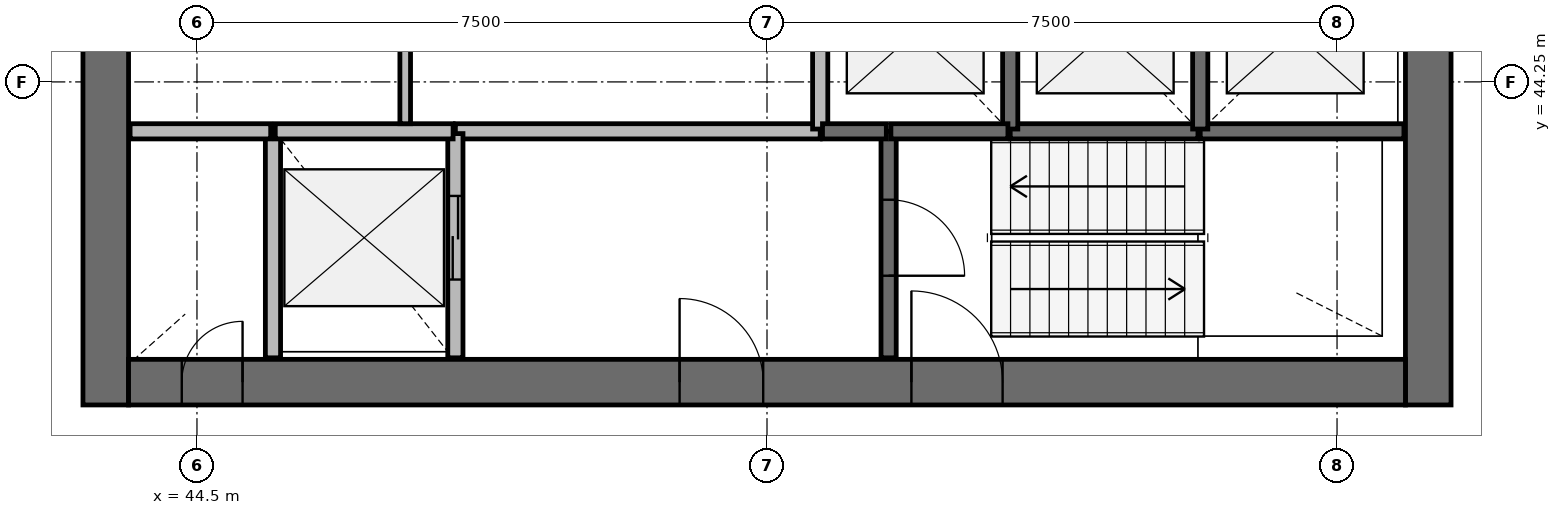
"""IFC4 building model, lengths in metres.
Left out: names, types, materials, properties, quantities, classifications, styles, units other than length and angle.
Written with IfcOpenShell. Run it as: python <this file> out.ifc"""

import sys

from ifc_helpers import new_model, si_unit, direction, frame, frame_2d, origin, place, context, subcontext, project, spatial, rectangle, extrude, source, transform, mapped, element, fill, save


model = new_model("IFC4")
c1 = context("Model", 3, precision=1e-05, world=origin(), true_north=direction((0.0, 1.0)))
c2 = subcontext(c1, "Body", "Model", "MODEL_VIEW")
j1 = project(units=[si_unit("LENGTHUNIT", "METRE"), si_unit("PLANEANGLEUNIT", "RADIAN")], contexts=[c1])
p1 = place(None, origin())
s1 = spatial("IfcSite", under=j1, at=p1, CompositionType="ELEMENT")
p2 = place(p1, origin())
s2 = spatial("IfcBuilding", under=s1, at=p2, CompositionType="ELEMENT")
p3 = place(p2, frame((0.0, 0.0, 211.1)))
s3 = spatial("IfcBuildingStorey", under=s2, at=p3, CompositionType="ELEMENT", Elevation=211.1)
p4 = place(p3, frame((60.7, 40.0, 0.0), z_axis=(0.0, 0.0, 1.0), x_axis=(0.0, 1.0, 0.0)))
e1 = element("IfcWall", 1, at=p4, inside=s3, PredefinedType="SHEAR", context=c2, shape_type="SweptSolid", body=[
    extrude(rectangle(XDim=16.0, YDim=0.6, at=frame_2d((8.0, 0.0))), origin(), (0.0, 0.0, 1.0), 3.9),
])
p5 = place(p4, frame((7.1, 0.0, 0.0)))
e2 = element("IfcOpeningElement", 2, at=p5, cuts=e1, PredefinedType="OPENING", context=c2, shape_type="SweptSolid", body=[
    extrude(rectangle(XDim=1.8, YDim=2.1, at=frame_2d((0.9, 1.05))), frame((0.0, 0.31, 0.0), z_axis=(0.0, -1.0, 0.0), x_axis=(1.0, 0.0, 0.0)), (0.0, 0.0, 1.0), 0.62),
])
p6 = place(p3, frame((43.3, 56.0, 0.0), z_axis=(0.0, 0.0, 1.0), x_axis=(0.0, -1.0, 0.0)))
e3 = element("IfcWall", 3, at=p6, inside=s3, PredefinedType="SHEAR", context=c2, shape_type="SweptSolid", body=[
    extrude(rectangle(XDim=16.0, YDim=0.6, at=frame_2d((8.0, 0.0))), origin(), (0.0, 0.0, 1.0), 3.9),
])
p7 = place(p6, frame((7.1, 0.0, 0.0)))
e4 = element("IfcOpeningElement", 4, at=p7, cuts=e3, PredefinedType="OPENING", context=c2, shape_type="SweptSolid", body=[
    extrude(rectangle(XDim=1.8, YDim=2.1, at=frame_2d((0.9, 1.05))), frame((0.0, 0.31, 0.0), z_axis=(0.0, -1.0, 0.0), x_axis=(1.0, 0.0, 0.0)), (0.0, 0.0, 1.0), 0.62),
])
p8 = place(p3, frame((43.6, 40.3, 0.0), z_axis=(0.0, 0.0, 1.0), x_axis=(1.0, 0.0, 0.0)))
e5 = element("IfcWall", 5, at=p8, inside=s3, PredefinedType="SHEAR", context=c2, shape_type="SweptSolid", body=[
    extrude(rectangle(XDim=16.8, YDim=0.6, at=frame_2d((8.4, 0.0))), origin(), (0.0, 0.0, 1.0), 3.9),
])
p9 = place(p8, frame((10.3, 0.0, 0.0)))
e6 = element("IfcOpeningElement", 6, at=p9, cuts=e5, PredefinedType="OPENING", context=c2, shape_type="SweptSolid", body=[
    extrude(rectangle(XDim=1.2, YDim=2.1, at=frame_2d((0.6, 1.05))), frame((0.0, 0.31, 0.0), z_axis=(0.0, -1.0, 0.0), x_axis=(1.0, 0.0, 0.0)), (0.0, 0.0, 1.0), 0.62),
])
p10 = place(p8, frame((7.25, 0.0, 0.0)))
e7 = element("IfcOpeningElement", 7, at=p10, cuts=e5, PredefinedType="OPENING", context=c2, shape_type="SweptSolid", body=[
    extrude(rectangle(XDim=1.1, YDim=2.1, at=frame_2d((0.55, 1.05))), frame((0.0, 0.31, 0.0), z_axis=(0.0, -1.0, 0.0), x_axis=(1.0, 0.0, 0.0)), (0.0, 0.0, 1.0), 0.62),
])
p11 = place(p8, frame((0.7, 0.0, 0.0)))
e8 = element("IfcOpeningElement", 8, at=p11, cuts=e5, PredefinedType="OPENING", context=c2, shape_type="SweptSolid", body=[
    extrude(rectangle(XDim=0.8, YDim=2.1, at=frame_2d((0.4, 1.05))), frame((0.0, 0.31, 0.0), z_axis=(0.0, -1.0, 0.0), x_axis=(1.0, 0.0, 0.0)), (0.0, 0.0, 1.0), 0.62),
])
p12 = place(p3, frame((52.7, 43.6, 0.0), z_axis=(0.0, 0.0, 1.0), x_axis=(-1.0, 0.0, 0.0)))
e9 = element("IfcWall", 9, at=p12, inside=s3, PredefinedType="SOLIDWALL", context=c2, shape_type="SweptSolid", body=[
    extrude(rectangle(XDim=4.8, YDim=0.2, at=frame_2d((2.4, 0.0))), origin(), (0.0, 0.0, 1.0), 3.58),
])
p13 = place(p3, frame((45.5, 43.6, 0.0), z_axis=(0.0, 0.0, 1.0), x_axis=(0.0, -1.0, 0.0)))
e10 = element("IfcWall", 10, at=p13, inside=s3, PredefinedType="SOLIDWALL", context=c2, shape_type="SweptSolid", body=[
    extrude(rectangle(XDim=2.98, YDim=0.2, at=frame_2d((1.49, 0.0))), origin(), (0.0, 0.0, 1.0), 3.58),
])
p14 = place(p3, frame((47.9, 40.62, 0.0), z_axis=(0.0, 0.0, 1.0), x_axis=(0.0, 1.0, 0.0)))
e11 = element("IfcWall", 11, at=p14, inside=s3, PredefinedType="SOLIDWALL", context=c2, shape_type="SweptSolid", body=[
    extrude(rectangle(XDim=2.95, YDim=0.2, at=frame_2d((1.475, 0.0))), origin(), (0.0, 0.0, 1.0), 3.58),
])
p15 = place(p14, frame((1.03, 0.0, 0.0)))
e12 = element("IfcOpeningElement", 12, at=p15, cuts=e11, PredefinedType="OPENING", context=c2, shape_type="SweptSolid", body=[
    extrude(rectangle(XDim=1.1, YDim=2.1, at=frame_2d((0.55, 1.05))), frame((0.0, 0.11, 0.0), z_axis=(0.0, -1.0, 0.0), x_axis=(1.0, 0.0, 0.0)), (0.0, 0.0, 1.0), 0.22),
])
p16 = place(p3, frame((53.6, 43.6, 0.0), z_axis=(0.0, 0.0, 1.0), x_axis=(0.0, -1.0, 0.0)))
e13 = element("IfcWall", 13, at=p16, inside=s3, PredefinedType="SOLIDWALL", context=c2, shape_type="SweptSolid", body=[
    extrude(rectangle(XDim=2.98, YDim=0.2, at=frame_2d((1.49, 0.0))), origin(), (0.0, 0.0, 1.0), 3.58),
])
p17 = place(p16, frame((0.9, 0.0, 0.0)))
e14 = element("IfcOpeningElement", 14, at=p17, cuts=e13, PredefinedType="OPENING", context=c2, shape_type="SweptSolid", body=[
    extrude(rectangle(XDim=1.0, YDim=2.1, at=frame_2d((0.5, 1.05))), frame((0.0, 0.11, 0.0), z_axis=(0.0, -1.0, 0.0), x_axis=(1.0, 0.0, 0.0)), (0.0, 0.0, 1.0), 0.22),
])
p18 = place(p3, frame((57.7, 43.6, 0.0), z_axis=(0.0, 0.0, 1.0), x_axis=(1.0, 0.0, 0.0)))
e15 = element("IfcWall", 15, at=p18, inside=s3, PredefinedType="SOLIDWALL", context=c2, shape_type="SweptSolid", body=[
    extrude(rectangle(XDim=2.68, YDim=0.2, at=frame_2d((1.34, 0.0))), origin(), (0.0, 0.0, 1.0), 3.58),
])
p19 = place(p3, frame((55.2, 43.6, 0.0), z_axis=(0.0, 0.0, 1.0), x_axis=(1.0, 0.0, 0.0)))
e16 = element("IfcWall", 16, at=p19, inside=s3, PredefinedType="SOLIDWALL", context=c2, shape_type="SweptSolid", body=[
    extrude(rectangle(XDim=2.47, YDim=0.2, at=frame_2d((1.235, 0.0))), origin(), (0.0, 0.0, 1.0), 3.58),
])
p20 = place(p3, frame((47.87, 43.6, 0.0), z_axis=(0.0, 0.0, 1.0), x_axis=(-1.0, 0.0, 0.0)))
e17 = element("IfcWall", 17, at=p20, inside=s3, PredefinedType="SOLIDWALL", context=c2, shape_type="SweptSolid", body=[
    extrude(rectangle(XDim=2.34, YDim=0.2, at=frame_2d((1.17, 0.0))), origin(), (0.0, 0.0, 1.0), 3.58),
])
for number, where, z_axis, x_axis in (
    (18, (52.7, 45.99, 0.0), (0.0, 0.0, 1.0), (0.0, -1.0, 0.0)),
    (19, (55.2, 43.63, 0.0), (0.0, 0.0, 1.0), (0.0, 1.0, 0.0)),
    (20, (57.7, 43.63, 0.0), (0.0, 0.0, 1.0), (0.0, 1.0, 0.0)),
):
    element("IfcWall", number, at=place(p3, frame(where, z_axis=z_axis, x_axis=x_axis)), inside=s3, PredefinedType="SOLIDWALL", context=c2, shape_type="SweptSolid", body=[
        extrude(rectangle(XDim=2.36, YDim=0.2, at=frame_2d((1.18, 0.0))), origin(), (0.0, 0.0, 1.0), 3.58),
    ])
p21 = place(p3, frame((45.47, 43.6, 0.0), z_axis=(0.0, 0.0, 1.0), x_axis=(-1.0, 0.0, 0.0)))
e21 = element("IfcWall", 21, at=p21, inside=s3, PredefinedType="SOLIDWALL", context=c2, shape_type="SweptSolid", body=[
    extrude(rectangle(XDim=1.85, YDim=0.2, at=frame_2d((0.925, 0.0))), origin(), (0.0, 0.0, 1.0), 3.58),
])
p22 = place(p3, frame((53.63, 43.6, 0.0), z_axis=(0.0, 0.0, 1.0), x_axis=(1.0, 0.0, 0.0)))
e22 = element("IfcWall", 22, at=p22, inside=s3, PredefinedType="SOLIDWALL", context=c2, shape_type="SweptSolid", body=[
    extrude(rectangle(XDim=1.54, YDim=0.2, at=frame_2d((0.77, 0.0))), origin(), (0.0, 0.0, 1.0), 3.58),
])
p23 = place(p3, frame((52.73, 43.6, 0.0), z_axis=(0.0, 0.0, 1.0), x_axis=(1.0, 0.0, 0.0)))
e23 = element("IfcWall", 23, at=p23, inside=s3, PredefinedType="SOLIDWALL", context=c2, shape_type="SweptSolid", body=[
    extrude(rectangle(XDim=0.84, YDim=0.2, at=frame_2d((0.42, 0.0))), origin(), (0.0, 0.0, 1.0), 3.58),
])
p24 = place(p3, frame((47.24, 43.7, 0.0), z_axis=(0.0, 0.0, 1.0), x_axis=(0.0, 1.0, 0.0)))
e24 = element("IfcWall", 24, at=p24, inside=s3, PredefinedType="PARTITIONING", context=c2, shape_type="SweptSolid", body=[
    extrude(rectangle(XDim=2.29, YDim=0.14, at=frame_2d((1.145, 0.0))), origin(), (0.0, 0.0, 1.0), 2.88),
])
m1 = source(origin(), c2, "Body", "SweptSolid", [
    extrude(rectangle(XDim=1.1, YDim=2.1, at=frame_2d((0.55, 1.05))), frame((0.0, 0.025, 0.0), z_axis=(0.0, -1.0, 0.0), x_axis=(1.0, 0.0, 0.0)), (0.0, 0.0, 1.0), 0.05),
])
p25 = place(p15, origin())
e25 = element("IfcDoor", 25, at=p25, inside=s3, OperationType="DOUBLE_DOOR_SLIDING", PredefinedType="USERDEFINED", context=c2, shape_type="MappedRepresentation", body=[
    mapped(m1, transform((0.0, 0.0, 0.0), scale=1.0)),
])
fill(e12, e25)
m2 = source(origin(), c2, "Body", "SweptSolid", [
    extrude(rectangle(XDim=1.2, YDim=2.1, at=frame_2d((0.6, 1.05))), frame((0.0, 0.025, 0.0), z_axis=(0.0, -1.0, 0.0), x_axis=(1.0, 0.0, 0.0)), (0.0, 0.0, 1.0), 0.05),
])
p26 = place(p9, origin())
e26 = element("IfcDoor", 26, at=p26, inside=s3, OperationType="SINGLE_SWING_LEFT", PredefinedType="DOOR", context=c2, shape_type="MappedRepresentation", body=[
    mapped(m2, transform((0.0, 0.0, 0.0), scale=1.0)),
])
fill(e6, e26)
m3 = source(origin(), c2, "Body", "SweptSolid", [
    extrude(rectangle(XDim=1.0, YDim=2.1, at=frame_2d((0.5, 1.05))), frame((0.0, 0.025, 0.0), z_axis=(0.0, -1.0, 0.0), x_axis=(1.0, 0.0, 0.0)), (0.0, 0.0, 1.0), 0.05),
])
p27 = place(p17, origin())
e27 = element("IfcDoor", 27, at=p27, inside=s3, OperationType="SINGLE_SWING_RIGHT", PredefinedType="DOOR", context=c2, shape_type="MappedRepresentation", body=[
    mapped(m3, transform((0.0, 0.0, 0.0), scale=1.0)),
])
fill(e14, e27)
m4 = source(origin(), c2, "Body", "SweptSolid", [
    extrude(rectangle(XDim=1.1, YDim=2.1, at=frame_2d((0.55, 1.05))), frame((0.0, 0.025, 0.0), z_axis=(0.0, -1.0, 0.0), x_axis=(1.0, 0.0, 0.0)), (0.0, 0.0, 1.0), 0.05),
])
p28 = place(p10, origin())
e28 = element("IfcDoor", 28, at=p28, inside=s3, OperationType="SINGLE_SWING_LEFT", PredefinedType="DOOR", context=c2, shape_type="MappedRepresentation", body=[
    mapped(m4, transform((0.0, 0.0, 0.0), scale=1.0)),
])
fill(e7, e28)
m5 = source(origin(), c2, "Body", "SweptSolid", [
    extrude(rectangle(XDim=0.8, YDim=2.1, at=frame_2d((0.4, 1.05))), frame((0.0, 0.025, 0.0), z_axis=(0.0, -1.0, 0.0), x_axis=(1.0, 0.0, 0.0)), (0.0, 0.0, 1.0), 0.05),
])
p29 = place(p11, origin())
e29 = element("IfcDoor", 29, at=p29, inside=s3, OperationType="SINGLE_SWING_RIGHT", PredefinedType="DOOR", context=c2, shape_type="MappedRepresentation", body=[
    mapped(m5, transform((0.0, 0.0, 0.0), scale=1.0)),
])
fill(e8, e29)
save(model, sys.argv[1])
